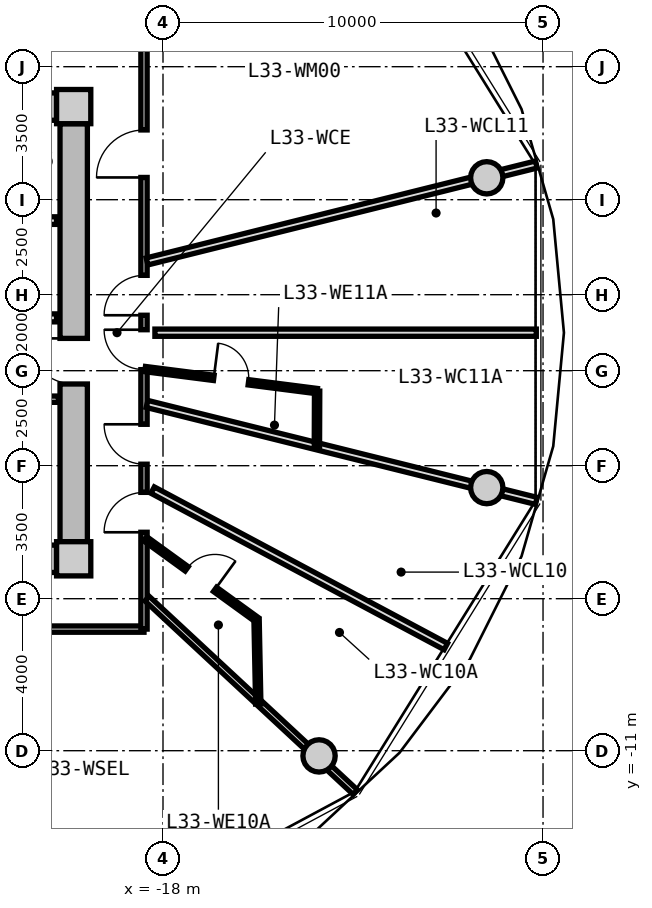
"""IFC4 building model, lengths in metres.
Left out: names, types, materials, properties, quantities, classifications, styles, units other than length and angle.
Written with IfcOpenShell. Run it as: python <this file> out.ifc"""

import sys

from ifc_helpers import new_model, si_unit, direction, frame, frame_2d, origin, origin_2d, place, context, subcontext, project, spatial, rectangle, circle, extrude, source, transform, mapped, element, fill, save


model = new_model("IFC4")
c1 = context("Model", 3, precision=1e-05, world=origin(), true_north=direction((0.0, 1.0)))
c2 = subcontext(c1, "Body", "Model", "MODEL_VIEW")
j1 = project(units=[si_unit("LENGTHUNIT", "METRE"), si_unit("PLANEANGLEUNIT", "RADIAN")], contexts=[c1])
p1 = place(None, origin())
s1 = spatial("IfcSite", under=j1, at=p1, CompositionType="ELEMENT")
p2 = place(p1, origin())
s2 = spatial("IfcBuilding", under=s1, at=p2, CompositionType="ELEMENT")
p3 = place(p2, frame((0.0, 0.0, 108.45)))
s3 = spatial("IfcBuildingStorey", under=s2, at=p3, CompositionType="ELEMENT", Elevation=108.45)
m1 = source(origin(), c2, "Body", "SweptSolid", [
    extrude(rectangle(XDim=0.9, YDim=0.9, at=origin_2d()), origin(), (0.0, 0.0, 1.0), 3.05),
])
for number, where, z_axis, x_axis in (
    (1, (-20.35, -5.95, 0.0), (0.0, 0.0, 1.0), (1.0, 0.0, 0.0)),
    (2, (-20.35, 5.95, 0.0), (0.0, 0.0, 1.0), (1.0, 0.0, 0.0)),
):
    element("IfcColumn", number, at=place(p3, frame(where, z_axis=z_axis, x_axis=x_axis)), inside=s3, PredefinedType="COLUMN", context=c2, shape_type="MappedRepresentation", body=[
        mapped(m1, transform((0.0, 0.0, 0.0), x_axis=(1.0, 0.0, 0.0), y_axis=(0.0, 1.0, 0.0), z_axis=(0.0, 0.0, 1.0), scale=1.0)),
    ])
m2 = source(origin(), c2, "Body", "SweptSolid", [
    extrude(rectangle(XDim=14.4, YDim=0.72, at=frame_2d((7.2, 0.0))), origin(), (0.0, 0.0, 1.0), 2.79),
])
for number, where, z_axis, x_axis in (
    (3, (-35.2, 5.95, 0.0), (0.0, 0.0, 1.0), (1.0, 0.0, 0.0)),
    (4, (-20.8, -5.95, 0.0), (0.0, 0.0, 1.0), (-1.0, 0.0, 0.0)),
):
    element("IfcWall", number, at=place(p3, frame(where, z_axis=z_axis, x_axis=x_axis)), inside=s3, PredefinedType="SHEAR", context=c2, shape_type="MappedRepresentation", body=[
        mapped(m2, transform((0.0, 0.0, 0.0), x_axis=(1.0, 0.0, 0.0), y_axis=(0.0, 1.0, 0.0), z_axis=(0.0, 0.0, 1.0), scale=1.0)),
    ])
m3 = source(origin(), c2, "Body", "SweptSolid", [
    extrude(rectangle(XDim=11.0, YDim=0.72, at=frame_2d((5.5, 0.0))), origin(), (0.0, 0.0, 1.0), 2.79),
])
p4 = place(p3, frame((-20.35, 5.5, 0.0), z_axis=(0.0, 0.0, 1.0), x_axis=(0.0, -1.0, 0.0)))
e5 = element("IfcWall", 5, at=p4, inside=s3, PredefinedType="SHEAR", context=c2, shape_type="MappedRepresentation", body=[
    mapped(m3, transform((0.0, 0.0, 0.0), x_axis=(1.0, 0.0, 0.0), y_axis=(0.0, 1.0, 0.0), z_axis=(0.0, 0.0, 1.0), scale=1.0)),
])
p5 = place(p4, frame((5.65, 0.0, 0.0)))
e6 = element("IfcOpeningElement", 6, at=p5, cuts=e5, PredefinedType="OPENING", context=c2, shape_type="SweptSolid", body=[
    extrude(rectangle(XDim=1.2, YDim=2.15, at=frame_2d((0.6, 1.075))), frame((0.0, 0.37, 0.0), z_axis=(0.0, -1.0, 0.0), x_axis=(1.0, 0.0, 0.0)), (0.0, 0.0, 1.0), 0.74),
])
m4 = source(origin(), c2, "Body", "SweptSolid", [
    extrude(circle(Radius=0.425, at=origin_2d()), origin(), (0.0, 0.0, 1.0), 3.05),
])
for number, where, z_axis, x_axis in (
    (7, (-9.481, 4.076, 0.0), (0.0, 0.0, 1.0), (1.0, 0.0, 0.0)),
    (8, (-13.894, -11.137, 0.0), (0.0, 0.0, 1.0), (1.0, 0.0, 0.0)),
    (9, (-9.481, -4.076, 0.0), (0.0, 0.0, 1.0), (1.0, 0.0, 0.0)),
):
    element("IfcColumn", number, at=place(p3, frame(where, z_axis=z_axis, x_axis=x_axis)), inside=s3, PredefinedType="COLUMN", context=c2, shape_type="MappedRepresentation", body=[
        mapped(m4, transform((0.0, 0.0, 0.0), x_axis=(1.0, 0.0, 0.0), y_axis=(0.0, 1.0, 0.0), z_axis=(0.0, 0.0, 1.0), scale=1.0)),
    ])
m5 = source(origin(), c2, "Body", "SweptSolid", [
    extrude(rectangle(XDim=3.2, YDim=0.2, at=frame_2d((1.6, 0.0))), origin(), (0.0, 0.0, 1.0), 2.775),
])
p6 = place(p3, frame((-24.0, 2.95, 0.0), z_axis=(0.0, 0.0, 1.0), x_axis=(1.0, 0.0, 0.0)))
e10 = element("IfcWall", 10, at=p6, inside=s3, PredefinedType="PARTITIONING", context=c2, shape_type="MappedRepresentation", body=[
    mapped(m5, transform((0.0, 0.0, 0.0), x_axis=(1.0, 0.0, 0.0), y_axis=(0.0, 1.0, 0.0), z_axis=(0.0, 0.0, 1.0), scale=1.0)),
])
m6 = source(origin(), c2, "Body", "SweptSolid", [
    extrude(rectangle(XDim=6.66, YDim=0.21, at=frame_2d((3.33, 0.0))), origin(), (0.0, 0.0, 1.0), 2.775),
])
p7 = place(p3, frame((-27.46, 0.39, 0.0), z_axis=(0.0, 0.0, 1.0), x_axis=(1.0, 0.0, 0.0)))
e11 = element("IfcWall", 11, at=p7, inside=s3, PredefinedType="PARTITIONING", context=c2, shape_type="MappedRepresentation", body=[
    mapped(m6, transform((0.0, 0.0, 0.0), x_axis=(1.0, 0.0, 0.0), y_axis=(0.0, 1.0, 0.0), z_axis=(0.0, 0.0, 1.0), scale=1.0)),
])
p8 = place(p7, frame((1.0, 0.0, 0.0)))
e12 = element("IfcOpeningElement", 12, at=p8, cuts=e11, PredefinedType="OPENING", context=c2, shape_type="SweptSolid", body=[
    extrude(rectangle(XDim=1.2, YDim=2.15, at=frame_2d((0.6, 1.075))), frame((0.0, 0.115, 0.0), z_axis=(0.0, -1.0, 0.0), x_axis=(1.0, 0.0, 0.0)), (0.0, 0.0, 1.0), 0.23),
])
m7 = source(origin(), c2, "Body", "SweptSolid", [
    extrude(rectangle(XDim=2.7, YDim=0.165, at=frame_2d((1.35, 0.0))), origin(), (0.0, 0.0, 1.0), 2.775),
])
p9 = place(p3, frame((-23.45, -1.75, 0.0), z_axis=(0.0, 0.0, 1.0), x_axis=(1.0, 0.0, 0.0)))
e13 = element("IfcWall", 13, at=p9, inside=s3, PredefinedType="PARTITIONING", context=c2, shape_type="MappedRepresentation", body=[
    mapped(m7, transform((0.0, 0.0, 0.0), x_axis=(1.0, 0.0, 0.0), y_axis=(0.0, 1.0, 0.0), z_axis=(0.0, 0.0, 1.0), scale=1.0)),
])
p10 = place(p9, frame((0.222, 0.0, 0.0)))
e14 = element("IfcOpeningElement", 14, at=p10, cuts=e13, PredefinedType="OPENING", context=c2, shape_type="SweptSolid", body=[
    extrude(rectangle(XDim=0.925, YDim=2.1, at=frame_2d((0.462, 1.05))), frame((0.0, 0.093, 0.0), z_axis=(0.0, -1.0, 0.0), x_axis=(1.0, 0.0, 0.0)), (0.0, 0.0, 1.0), 0.185),
])
p11 = place(p9, frame((1.522, 0.0, 0.0)))
e15 = element("IfcOpeningElement", 15, at=p11, cuts=e13, PredefinedType="OPENING", context=c2, shape_type="SweptSolid", body=[
    extrude(rectangle(XDim=0.925, YDim=2.1, at=frame_2d((0.462, 1.05))), frame((0.0, 0.093, 0.0), z_axis=(0.0, -1.0, 0.0), x_axis=(1.0, 0.0, 0.0)), (0.0, 0.0, 1.0), 0.185),
])
m8 = source(origin(), c2, "Body", "SweptSolid", [
    extrude(rectangle(XDim=8.6, YDim=0.165, at=frame_2d((4.3, 0.0))), origin(), (0.0, 0.0, 1.0), 2.775),
])
p12 = place(p3, frame((-18.5, -7.8, 0.0), z_axis=(0.0, 0.0, 1.0), x_axis=(-1.0, 0.0, 0.0)))
e16 = element("IfcWall", 16, at=p12, inside=s3, PredefinedType="PARTITIONING", context=c2, shape_type="MappedRepresentation", body=[
    mapped(m8, transform((0.0, 0.0, 0.0), x_axis=(1.0, 0.0, 0.0), y_axis=(0.0, 1.0, 0.0), z_axis=(0.0, 0.0, 1.0), scale=1.0)),
])
p13 = place(p12, frame((3.775, 0.0, 0.0)))
e17 = element("IfcOpeningElement", 17, at=p13, cuts=e16, PredefinedType="OPENING", context=c2, shape_type="SweptSolid", body=[
    extrude(rectangle(XDim=1.05, YDim=2.15, at=frame_2d((0.525, 1.075))), frame((0.0, 0.093, 0.0), z_axis=(0.0, -1.0, 0.0), x_axis=(1.0, 0.0, 0.0)), (0.0, 0.0, 1.0), 0.185),
])
m9 = source(origin(), c2, "Body", "SweptSolid", [
    extrude(rectangle(XDim=15.6, YDim=0.165, at=frame_2d((7.8, 0.0))), origin(), (0.0, 0.0, 1.0), 2.775),
])
p14 = place(p3, frame((-18.5, 7.8, 0.0), z_axis=(0.0, 0.0, 1.0), x_axis=(0.0, -1.0, 0.0)))
e18 = element("IfcWall", 18, at=p14, inside=s3, PredefinedType="PARTITIONING", context=c2, shape_type="MappedRepresentation", body=[
    mapped(m9, transform((0.0, 0.0, 0.0), x_axis=(1.0, 0.0, 0.0), y_axis=(0.0, 1.0, 0.0), z_axis=(0.0, 0.0, 1.0), scale=1.0)),
])
p15 = place(p14, frame((12.002, 0.0, 0.0)))
e19 = element("IfcOpeningElement", 19, at=p15, cuts=e18, PredefinedType="OPENING", context=c2, shape_type="SweptSolid", body=[
    extrude(rectangle(XDim=1.05, YDim=2.15, at=frame_2d((0.525, 1.075))), frame((0.0, 0.093, 0.0), z_axis=(0.0, -1.0, 0.0), x_axis=(1.0, 0.0, 0.0)), (0.0, 0.0, 1.0), 0.185),
])
p16 = place(p14, frame((10.211, 0.0, 0.0)))
e20 = element("IfcOpeningElement", 20, at=p16, cuts=e18, PredefinedType="OPENING", context=c2, shape_type="SweptSolid", body=[
    extrude(rectangle(XDim=1.05, YDim=2.15, at=frame_2d((0.525, 1.075))), frame((0.0, 0.093, 0.0), z_axis=(0.0, -1.0, 0.0), x_axis=(1.0, 0.0, 0.0)), (0.0, 0.0, 1.0), 0.185),
])
p17 = place(p14, frame((7.722, 0.0, 0.0)))
e21 = element("IfcOpeningElement", 21, at=p17, cuts=e18, PredefinedType="OPENING", context=c2, shape_type="SweptSolid", body=[
    extrude(rectangle(XDim=1.05, YDim=2.15, at=frame_2d((0.525, 1.075))), frame((0.0, 0.093, 0.0), z_axis=(0.0, -1.0, 0.0), x_axis=(1.0, 0.0, 0.0)), (0.0, 0.0, 1.0), 0.185),
])
p18 = place(p14, frame((6.291, 0.0, 0.0)))
e22 = element("IfcOpeningElement", 22, at=p18, cuts=e18, PredefinedType="OPENING", context=c2, shape_type="SweptSolid", body=[
    extrude(rectangle(XDim=1.05, YDim=2.15, at=frame_2d((0.525, 1.075))), frame((0.0, 0.093, 0.0), z_axis=(0.0, -1.0, 0.0), x_axis=(1.0, 0.0, 0.0)), (0.0, 0.0, 1.0), 0.185),
])
p19 = place(p14, frame((2.465, 0.0, 0.0)))
e23 = element("IfcOpeningElement", 23, at=p19, cuts=e18, PredefinedType="OPENING", context=c2, shape_type="SweptSolid", body=[
    extrude(rectangle(XDim=1.25, YDim=2.2, at=frame_2d((0.625, 1.1))), frame((0.0, 0.093, 0.0), z_axis=(0.0, -1.0, 0.0), x_axis=(1.0, 0.0, 0.0)), (0.0, 0.0, 1.0), 0.185),
])
m10 = source(origin(), c2, "Body", "SweptSolid", [
    extrude(rectangle(XDim=7.482, YDim=0.165, at=frame_2d((3.741, 0.0))), origin(), (0.0, 0.0, 1.0), 2.275),
])
p20 = place(p3, frame((-18.42, -6.998, 0.0), z_axis=(0.0, 0.0, 1.0), x_axis=(0.732508698043, -0.680757671489, 0.0)))
e24 = element("IfcWall", 24, at=p20, inside=s3, PredefinedType="PARTITIONING", context=c2, shape_type="MappedRepresentation", body=[
    mapped(m10, transform((0.0, 0.0, 0.0), x_axis=(1.0, 0.0, 0.0), y_axis=(0.0, 1.0, 0.0), z_axis=(0.0, 0.0, 1.0), scale=1.0)),
])
m11 = source(origin(), c2, "Body", "SweptSolid", [
    extrude(rectangle(XDim=10.556, YDim=0.19, at=frame_2d((5.278, 0.0))), origin(), (0.0, 0.0, 1.0), 2.275),
])
p21 = place(p3, frame((-18.42, -1.875, 0.0), z_axis=(0.0, 0.0, 1.0), x_axis=(0.970363857851, -0.241648470667, 0.0)))
e25 = element("IfcWall", 25, at=p21, inside=s3, PredefinedType="PARTITIONING", context=c2, shape_type="MappedRepresentation", body=[
    mapped(m11, transform((0.0, 0.0, 0.0), x_axis=(1.0, 0.0, 0.0), y_axis=(0.0, 1.0, 0.0), z_axis=(0.0, 0.0, 1.0), scale=1.0)),
])
m12 = source(origin(), c2, "Body", "SweptSolid", [
    extrude(rectangle(XDim=8.744, YDim=0.19, at=frame_2d((4.372, 0.0))), origin(), (0.0, 0.0, 1.0), 2.775),
])
p22 = place(p3, frame((-18.273, -4.142, 0.0), z_axis=(0.0, 0.0, 1.0), x_axis=(0.882252449936, -0.470776607938, 0.0)))
e26 = element("IfcWall", 26, at=p22, inside=s3, PredefinedType="PARTITIONING", context=c2, shape_type="MappedRepresentation", body=[
    mapped(m12, transform((0.0, 0.0, 0.0), x_axis=(1.0, 0.0, 0.0), y_axis=(0.0, 1.0, 0.0), z_axis=(0.0, 0.0, 1.0), scale=1.0)),
])
m13 = source(origin(), c2, "Body", "SweptSolid", [
    extrude(rectangle(XDim=3.621, YDim=0.14, at=frame_2d((1.811, 0.0))), origin(), (0.0, 0.0, 1.0), 2.775),
])
p23 = place(p3, frame((-18.47, -5.422, 0.0), z_axis=(0.0, 0.0, 1.0), x_axis=(0.80968252222, -0.586868139544, 0.0)))
e27 = element("IfcWall", 27, at=p23, inside=s3, PredefinedType="PARTITIONING", context=c2, shape_type="MappedRepresentation", body=[
    mapped(m13, transform((0.0, 0.0, 0.0), x_axis=(1.0, 0.0, 0.0), y_axis=(0.0, 1.0, 0.0), z_axis=(0.0, 0.0, 1.0), scale=1.0)),
])
p24 = place(p23, frame((1.351, 0.0, 0.0)))
e28 = element("IfcOpeningElement", 28, at=p24, cuts=e27, PredefinedType="OPENING", context=c2, shape_type="SweptSolid", body=[
    extrude(rectangle(XDim=0.92, YDim=2.1, at=frame_2d((0.46, 1.05))), frame((0.0, 0.08, 0.0), z_axis=(0.0, -1.0, 0.0), x_axis=(1.0, 0.0, 0.0)), (0.0, 0.0, 1.0), 0.16),
])
m14 = source(origin(), c2, "Body", "SweptSolid", [
    extrude(rectangle(XDim=2.225, YDim=0.14, at=frame_2d((1.112, 0.0))), origin(), (0.0, 0.0, 1.0), 2.775),
])
p25 = place(p3, frame((-15.538, -7.547, 0.0), z_axis=(0.0, 0.0, 1.0), x_axis=(0.019971869027, -0.999800542332, 0.0)))
e29 = element("IfcWall", 29, at=p25, inside=s3, PredefinedType="PARTITIONING", context=c2, shape_type="MappedRepresentation", body=[
    mapped(m14, transform((0.0, 0.0, 0.0), x_axis=(1.0, 0.0, 0.0), y_axis=(0.0, 1.0, 0.0), z_axis=(0.0, 0.0, 1.0), scale=1.0)),
])
p26 = place(p3, frame((-18.42, 1.875, 0.0), z_axis=(0.0, 0.0, 1.0), x_axis=(0.970363857851, 0.241648470667, 0.0)))
e30 = element("IfcWall", 30, at=p26, inside=s3, PredefinedType="PARTITIONING", context=c2, shape_type="MappedRepresentation", body=[
    mapped(m11, transform((0.0, 0.0, 0.0), x_axis=(1.0, 0.0, 0.0), y_axis=(0.0, 1.0, 0.0), z_axis=(0.0, 0.0, 1.0), scale=1.0)),
])
m15 = source(origin(), c2, "Body", "SweptSolid", [
    extrude(rectangle(XDim=10.036, YDim=0.19, at=frame_2d((5.018, 0.0))), origin(), (0.0, 0.0, 1.0), 2.775),
])
p27 = place(p3, frame((-18.213, 0.0, 0.0), z_axis=(0.0, 0.0, 1.0), x_axis=(1.0, 0.0, 0.0)))
e31 = element("IfcWall", 31, at=p27, inside=s3, PredefinedType="PARTITIONING", context=c2, shape_type="MappedRepresentation", body=[
    mapped(m15, transform((0.0, 0.0, 0.0), x_axis=(1.0, 0.0, 0.0), y_axis=(0.0, 1.0, 0.0), z_axis=(0.0, 0.0, 1.0), scale=1.0)),
])
m16 = source(origin(), c2, "Body", "SweptSolid", [
    extrude(rectangle(XDim=4.562, YDim=0.14, at=frame_2d((2.281, 0.0))), origin(), (0.0, 0.0, 1.0), 2.775),
])
p28 = place(p3, frame((-18.47, -0.958, 0.0), z_axis=(0.0, 0.0, 1.0), x_axis=(0.991904666356, -0.126984774129, 0.0)))
e32 = element("IfcWall", 32, at=p28, inside=s3, PredefinedType="PARTITIONING", context=c2, shape_type="MappedRepresentation", body=[
    mapped(m16, transform((0.0, 0.0, 0.0), x_axis=(1.0, 0.0, 0.0), y_axis=(0.0, 1.0, 0.0), z_axis=(0.0, 0.0, 1.0), scale=1.0)),
])
p29 = place(p28, frame((1.821, 0.0, 0.0)))
e33 = element("IfcOpeningElement", 33, at=p29, cuts=e32, PredefinedType="OPENING", context=c2, shape_type="SweptSolid", body=[
    extrude(rectangle(XDim=0.92, YDim=2.1, at=frame_2d((0.46, 1.05))), frame((0.0, 0.08, 0.0), z_axis=(0.0, -1.0, 0.0), x_axis=(1.0, 0.0, 0.0)), (0.0, 0.0, 1.0), 0.16),
])
m17 = source(origin(), c2, "Body", "SweptSolid", [
    extrude(rectangle(XDim=1.468, YDim=0.14, at=frame_2d((0.734, 0.0))), origin(), (0.0, 0.0, 1.0), 2.775),
])
p30 = place(p3, frame((-13.945, -1.537, 0.0), z_axis=(0.0, 0.0, 1.0), x_axis=(-0.00399198416, -0.999992031999, 0.0)))
e34 = element("IfcWall", 34, at=p30, inside=s3, PredefinedType="PARTITIONING", context=c2, shape_type="MappedRepresentation", body=[
    mapped(m17, transform((0.0, 0.0, 0.0), x_axis=(1.0, 0.0, 0.0), y_axis=(0.0, 1.0, 0.0), z_axis=(0.0, 0.0, 1.0), scale=1.0)),
])
m18 = source(origin(), c2, "Body", "SweptSolid", [
    extrude(rectangle(XDim=1.2, YDim=2.15, at=frame_2d((0.6, 1.075))), frame((0.0, 0.025, 0.0), z_axis=(0.0, -1.0, 0.0), x_axis=(1.0, 0.0, 0.0)), (0.0, 0.0, 1.0), 0.05),
])
p31 = place(p5, frame((1.2, 0.0, 0.0), z_axis=(0.0, 0.0, 1.0), x_axis=(-1.0, 0.0, 0.0)))
e35 = element("IfcDoor", 35, at=p31, inside=s3, OperationType="SINGLE_SWING_RIGHT", PredefinedType="DOOR", context=c2, shape_type="MappedRepresentation", body=[
    mapped(m18, transform((0.0, 0.0, 0.0), x_axis=(1.0, 0.0, 0.0), y_axis=(0.0, 1.0, 0.0), z_axis=(0.0, 0.0, 1.0), scale=1.0)),
])
fill(e6, e35)
m19 = source(origin(), c2, "Body", "SweptSolid", [
    extrude(rectangle(XDim=1.05, YDim=2.15, at=frame_2d((0.525, 1.075))), frame((0.0, 0.025, 0.0), z_axis=(0.0, -1.0, 0.0), x_axis=(1.0, 0.0, 0.0)), (0.0, 0.0, 1.0), 0.05),
])
p32 = place(p15, frame((1.05, 0.0, 0.0), z_axis=(0.0, 0.0, 1.0), x_axis=(-1.0, 0.0, 0.0)))
e36 = element("IfcDoor", 36, at=p32, inside=s3, OperationType="SINGLE_SWING_LEFT", PredefinedType="DOOR", context=c2, shape_type="MappedRepresentation", body=[
    mapped(m19, transform((0.0, 0.0, 0.0), x_axis=(1.0, 0.0, 0.0), y_axis=(0.0, 1.0, 0.0), z_axis=(0.0, 0.0, 1.0), scale=1.0)),
])
fill(e19, e36)
m20 = source(origin(), c2, "Body", "SweptSolid", [
    extrude(rectangle(XDim=0.92, YDim=2.1, at=frame_2d((0.46, 1.05))), frame((0.0, 0.025, 0.0), z_axis=(0.0, -1.0, 0.0), x_axis=(1.0, 0.0, 0.0)), (0.0, 0.0, 1.0), 0.05),
])
p33 = place(p24, origin())
e37 = element("IfcDoor", 37, at=p33, inside=s3, OperationType="SINGLE_SWING_RIGHT", PredefinedType="DOOR", context=c2, shape_type="MappedRepresentation", body=[
    mapped(m20, transform((0.0, 0.0, 0.0), x_axis=(1.0, 0.0, 0.0), y_axis=(0.0, 1.0, 0.0), z_axis=(0.0, 0.0, 1.0), scale=1.0)),
])
fill(e28, e37)
p34 = place(p16, frame((1.05, 0.0, 0.0), z_axis=(0.0, 0.0, 1.0), x_axis=(-1.0, 0.0, 0.0)))
e38 = element("IfcDoor", 38, at=p34, inside=s3, OperationType="SINGLE_SWING_RIGHT", PredefinedType="DOOR", context=c2, shape_type="MappedRepresentation", body=[
    mapped(m19, transform((0.0, 0.0, 0.0), x_axis=(1.0, 0.0, 0.0), y_axis=(0.0, 1.0, 0.0), z_axis=(0.0, 0.0, 1.0), scale=1.0)),
])
fill(e20, e38)
p35 = place(p17, frame((1.05, 0.0, 0.0), z_axis=(0.0, 0.0, 1.0), x_axis=(-1.0, 0.0, 0.0)))
e39 = element("IfcDoor", 39, at=p35, inside=s3, OperationType="SINGLE_SWING_RIGHT", PredefinedType="DOOR", context=c2, shape_type="MappedRepresentation", body=[
    mapped(m19, transform((0.0, 0.0, 0.0), x_axis=(1.0, 0.0, 0.0), y_axis=(0.0, 1.0, 0.0), z_axis=(0.0, 0.0, 1.0), scale=1.0)),
])
fill(e21, e39)
p36 = place(p29, origin())
e40 = element("IfcDoor", 40, at=p36, inside=s3, OperationType="SINGLE_SWING_LEFT", PredefinedType="DOOR", context=c2, shape_type="MappedRepresentation", body=[
    mapped(m20, transform((0.0, 0.0, 0.0), x_axis=(1.0, 0.0, 0.0), y_axis=(0.0, 1.0, 0.0), z_axis=(0.0, 0.0, 1.0), scale=1.0)),
])
fill(e33, e40)
p37 = place(p18, frame((1.05, 0.0, 0.0), z_axis=(0.0, 0.0, 1.0), x_axis=(-1.0, 0.0, 0.0)))
e41 = element("IfcDoor", 41, at=p37, inside=s3, OperationType="SINGLE_SWING_LEFT", PredefinedType="DOOR", context=c2, shape_type="MappedRepresentation", body=[
    mapped(m19, transform((0.0, 0.0, 0.0), x_axis=(1.0, 0.0, 0.0), y_axis=(0.0, 1.0, 0.0), z_axis=(0.0, 0.0, 1.0), scale=1.0)),
])
fill(e22, e41)
m21 = source(origin(), c2, "Body", "SweptSolid", [
    extrude(rectangle(XDim=1.25, YDim=2.2, at=frame_2d((0.625, 1.1))), frame((0.0, 0.025, 0.0), z_axis=(0.0, -1.0, 0.0), x_axis=(1.0, 0.0, 0.0)), (0.0, 0.0, 1.0), 0.05),
])
p38 = place(p19, frame((1.25, 0.0, 0.0), z_axis=(0.0, 0.0, 1.0), x_axis=(-1.0, 0.0, 0.0)))
e42 = element("IfcDoor", 42, at=p38, inside=s3, OperationType="SINGLE_SWING_LEFT", PredefinedType="DOOR", context=c2, shape_type="MappedRepresentation", body=[
    mapped(m21, transform((0.0, 0.0, 0.0), x_axis=(1.0, 0.0, 0.0), y_axis=(0.0, 1.0, 0.0), z_axis=(0.0, 0.0, 1.0), scale=1.0)),
])
fill(e23, e42)
save(model, sys.argv[1])
